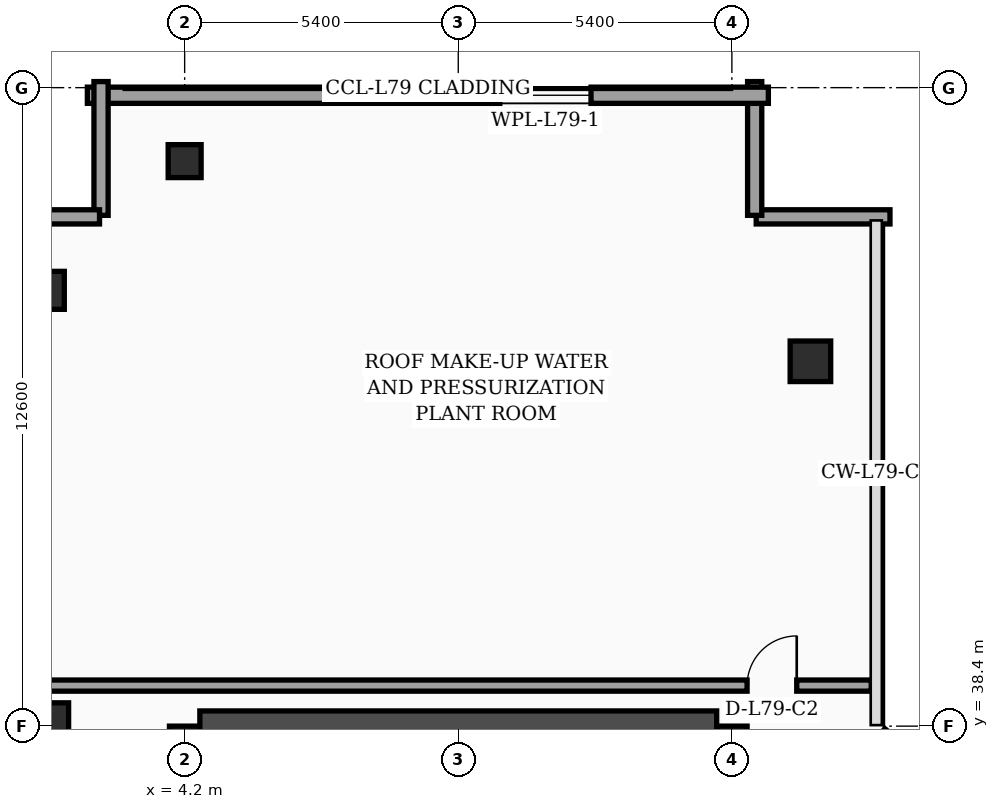
"""IFC4 building model, lengths in metres.
Left out: names, types, materials, properties, quantities, classifications, styles, units other than length and angle.
Written with IfcOpenShell. Run it as: python <this file> out.ifc"""

import sys

from ifc_helpers import new_model, si_unit, direction, frame, frame_2d, origin, origin_2d, place, context, subcontext, project, spatial, rectangle, hollow_rectangle, extrude, element, fill, save


model = new_model("IFC4")
c1 = context("Model", 3, precision=1e-05, world=origin(), true_north=direction((0.0, 1.0)))
c2 = subcontext(c1, "Body", "Model", "MODEL_VIEW")
j1 = project(units=[si_unit("LENGTHUNIT", "METRE"), si_unit("PLANEANGLEUNIT", "RADIAN")], contexts=[c1])
p1 = place(None, origin())
s1 = spatial("IfcSite", under=j1, at=p1, CompositionType="ELEMENT")
p2 = place(p1, origin())
s2 = spatial("IfcBuilding", under=s1, at=p2, CompositionType="ELEMENT")
p3 = place(p2, frame((0.0, 0.0, 320.5)))
s3 = spatial("IfcBuildingStorey", under=s2, at=p3, CompositionType="ELEMENT", Elevation=320.5)
p4 = place(p3, frame((4.2, 16.8, 0.0), z_axis=(0.0, 0.0, 1.0), x_axis=(0.0, 1.0, 0.0)))
e1 = element("IfcWall", 1, at=p4, inside=s3, PredefinedType="SHEAR", context=c2, shape_type="SweptSolid", body=[
    extrude(rectangle(XDim=21.6, YDim=0.6, at=frame_2d((10.8, 0.0))), origin(), (0.0, 0.0, 1.0), 4.76),
])
p5 = place(p3, frame((15.0, 16.8, 0.0), z_axis=(0.0, 0.0, 1.0), x_axis=(0.0, 1.0, 0.0)))
e2 = element("IfcWall", 2, at=p5, inside=s3, PredefinedType="SHEAR", context=c2, shape_type="SweptSolid", body=[
    extrude(rectangle(XDim=21.6, YDim=0.6, at=frame_2d((10.8, 0.0))), origin(), (0.0, 0.0, 1.0), 4.76),
])
p6 = place(p5, frame((8.65, 0.0, 0.0)))
e3 = element("IfcOpeningElement", 3, at=p6, cuts=e2, PredefinedType="OPENING", context=c2, shape_type="SweptSolid", body=[
    extrude(rectangle(XDim=1.1, YDim=2.2, at=frame_2d((0.55, 1.1))), frame((0.0, 0.31, 0.0), z_axis=(0.0, -1.0, 0.0), x_axis=(1.0, 0.0, 0.0)), (0.0, 0.0, 1.0), 0.62),
])
p7 = place(p3, frame((4.5, 38.4, 0.0), z_axis=(0.0, 0.0, 1.0), x_axis=(1.0, 0.0, 0.0)))
e4 = element("IfcWall", 4, at=p7, inside=s3, PredefinedType="SHEAR", context=c2, shape_type="SweptSolid", body=[
    extrude(rectangle(XDim=10.2, YDim=0.6, at=frame_2d((5.1, 0.0))), origin(), (0.0, 0.0, 1.0), 4.76),
])
p8 = place(p3, frame((1.45, 38.4, 0.0), z_axis=(0.0, 0.0, 1.0), x_axis=(1.0, 0.0, 0.0)))
e5 = element("IfcColumn", 5, at=p8, inside=s3, PredefinedType="COLUMN", context=c2, shape_type="SweptSolid", body=[
    extrude(rectangle(XDim=0.92, YDim=0.92, at=origin_2d()), origin(), (0.0, 0.0, 1.0), 4.76),
])
p9 = place(p3, frame((1.45, 47.0, 0.0), z_axis=(0.0, 0.0, 1.0), x_axis=(1.0, 0.0, 0.0)))
e6 = element("IfcColumn", 6, at=p9, inside=s3, PredefinedType="COLUMN", context=c2, shape_type="SweptSolid", body=[
    extrude(hollow_rectangle(XDim=0.75, YDim=0.75, WallThickness=0.032, at=origin_2d()), origin(), (0.0, 0.0, 1.0), 4.76),
])
p10 = place(p3, frame((4.2, 49.55, 0.0), z_axis=(0.0, 0.0, 1.0), x_axis=(1.0, 0.0, 0.0)))
e7 = element("IfcColumn", 7, at=p10, inside=s3, PredefinedType="COLUMN", context=c2, shape_type="SweptSolid", body=[
    extrude(hollow_rectangle(XDim=0.65, YDim=0.65, WallThickness=0.028, at=origin_2d()), origin(), (0.0, 0.0, 1.0), 4.76),
])
p11 = place(p3, frame((16.55, 45.6, 0.0), z_axis=(0.0, 0.0, 1.0), x_axis=(1.0, 0.0, 0.0)))
e8 = element("IfcColumn", 8, at=p11, inside=s3, PredefinedType="COLUMN", context=c2, shape_type="SweptSolid", body=[
    extrude(rectangle(XDim=0.8, YDim=0.8, at=origin_2d()), origin(), (0.0, 0.0, 1.0), 4.76),
])
for number, where, z_axis, x_axis in (
    (9, (18.12, 48.45, 0.0), (0.0, 0.0, 1.0), (-1.0, 0.0, 0.0)),
    (10, (15.45, 48.48, 0.0), (0.0, 0.0, 1.0), (0.0, 1.0, 0.0)),
):
    element("IfcWall", number, at=place(p3, frame(where, z_axis=z_axis, x_axis=x_axis)), inside=s3, PredefinedType="SOLIDWALL", context=c2, shape_type="SweptSolid", body=[
        extrude(rectangle(XDim=2.64, YDim=0.28, at=frame_2d((1.32, 0.0))), origin(), (0.0, 0.0, 1.0), 4.76),
    ])
p12 = place(p3, frame((15.72, 50.85, 0.0), z_axis=(0.0, 0.0, 1.0), x_axis=(-1.0, 0.0, 0.0)))
e11 = element("IfcWall", 11, at=p12, inside=s3, PredefinedType="SOLIDWALL", context=c2, shape_type="SweptSolid", body=[
    extrude(rectangle(XDim=13.44, YDim=0.32, at=frame_2d((6.72, 0.0))), origin(), (0.0, 0.0, 1.0), 4.76),
])
p13 = place(p12, frame((3.5, 0.0, 1.1)))
e12 = element("IfcOpeningElement", 12, at=p13, cuts=e11, PredefinedType="OPENING", context=c2, shape_type="SweptSolid", body=[
    extrude(rectangle(XDim=1.8, YDim=1.5, at=frame_2d((0.9, 0.75))), frame((0.0, 0.17, 0.0), z_axis=(0.0, -1.0, 0.0), x_axis=(1.0, 0.0, 0.0)), (0.0, 0.0, 1.0), 0.34),
])
for number, where, z_axis, x_axis in (
    (13, (2.55, 51.12, 0.0), (0.0, 0.0, 1.0), (0.0, -1.0, 0.0)),
    (14, (2.52, 48.45, 0.0), (0.0, 0.0, 1.0), (-1.0, 0.0, 0.0)),
):
    element("IfcWall", number, at=place(p3, frame(where, z_axis=z_axis, x_axis=x_axis)), inside=s3, PredefinedType="SOLIDWALL", context=c2, shape_type="SweptSolid", body=[
        extrude(rectangle(XDim=2.64, YDim=0.28, at=frame_2d((1.32, 0.0))), origin(), (0.0, 0.0, 1.0), 4.76),
    ])
p14 = place(p3, frame((0.08, 39.2, 0.0), z_axis=(0.0, 0.0, 1.0), x_axis=(1.0, 0.0, 0.0)))
e15 = element("IfcWall", 15, at=p14, inside=s3, PredefinedType="SOLIDWALL", context=c2, shape_type="SweptSolid", body=[
    extrude(rectangle(XDim=17.67, YDim=0.22, at=frame_2d((8.835, 0.0))), origin(), (0.0, 0.0, 1.0), 4.19),
])
p15 = place(p14, frame((15.22, 0.0, 0.0)))
e16 = element("IfcOpeningElement", 16, at=p15, cuts=e15, PredefinedType="OPENING", context=c2, shape_type="SweptSolid", body=[
    extrude(rectangle(XDim=0.98, YDim=2.15, at=frame_2d((0.49, 1.075))), frame((0.0, 0.12, 0.0), z_axis=(0.0, -1.0, 0.0), x_axis=(1.0, 0.0, 0.0)), (0.0, 0.0, 1.0), 0.24),
])
p16 = place(p13, origin())
e17 = element("IfcWindow", 17, at=p16, inside=s3, PartitioningType="SINGLE_PANEL", PredefinedType="WINDOW", context=c2, shape_type="SweptSolid", body=[
    extrude(rectangle(XDim=1.8, YDim=1.5, at=frame_2d((0.9, 0.75))), frame((0.0, 0.03, 0.0), z_axis=(0.0, -1.0, 0.0), x_axis=(1.0, 0.0, 0.0)), (0.0, 0.0, 1.0), 0.06),
])
fill(e12, e17)
p17 = place(p15, origin())
e18 = element("IfcDoor", 18, at=p17, inside=s3, OperationType="SINGLE_SWING_RIGHT", PredefinedType="DOOR", context=c2, shape_type="SweptSolid", body=[
    extrude(rectangle(XDim=0.98, YDim=2.15, at=frame_2d((0.49, 1.075))), frame((0.0, 0.025, 0.0), z_axis=(0.0, -1.0, 0.0), x_axis=(1.0, 0.0, 0.0)), (0.0, 0.0, 1.0), 0.05),
])
fill(e16, e18)
save(model, sys.argv[1])
